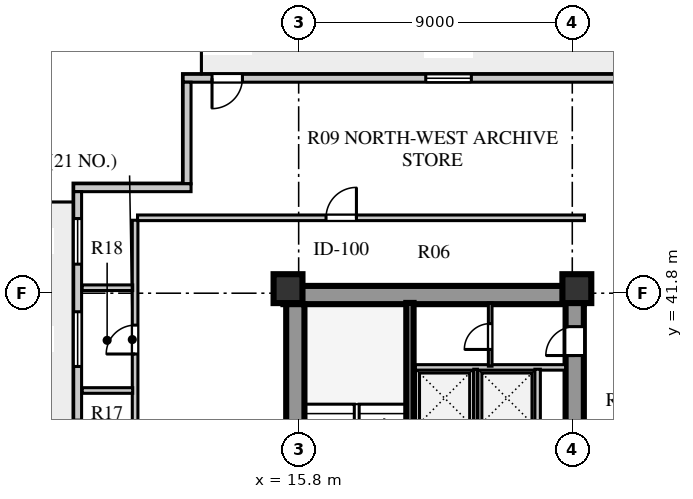
"""IFC4 building model, lengths in metres.
Left out: names, types, materials, properties, quantities, classifications, styles, units other than length and angle.
Written with IfcOpenShell. Run it as: python <this file> out.ifc"""

import sys

from ifc_helpers import new_model, si_unit, direction, frame, frame_2d, origin, origin_2d, place, context, subcontext, project, spatial, rectangle, extrude, element, fill, save


model = new_model("IFC4")
c1 = context("Model", 3, precision=1e-05, world=origin(), true_north=direction((0.0, 1.0)))
c2 = subcontext(c1, "Body", "Model", "MODEL_VIEW")
j1 = project(units=[si_unit("LENGTHUNIT", "METRE"), si_unit("PLANEANGLEUNIT", "RADIAN")], contexts=[c1])
p1 = place(None, origin())
s1 = spatial("IfcSite", under=j1, at=p1, CompositionType="ELEMENT")
p2 = place(p1, origin())
s2 = spatial("IfcBuilding", under=s1, at=p2, CompositionType="ELEMENT")
p3 = place(p2, frame((0.0, 0.0, 82.0)))
s3 = spatial("IfcBuildingStorey", under=s2, at=p3, CompositionType="ELEMENT", Elevation=82.0)
p4 = place(p3, frame((15.3, 41.74, 0.0), z_axis=(0.0, 0.0, 1.0), x_axis=(1.0, 0.0, 0.0)))
e1 = element("IfcWall", 1, at=p4, inside=s3, PredefinedType="SHEAR", context=c2, shape_type="SweptSolid", body=[
    extrude(rectangle(XDim=9.88, YDim=0.6, at=frame_2d((4.94, 0.0))), origin(), (0.0, 0.0, 1.0), 3.74),
])
p5 = place(p3, frame((15.69, 15.81, 0.0), z_axis=(0.0, 0.0, 1.0), x_axis=(0.0, 1.0, 0.0)))
e2 = element("IfcWall", 2, at=p5, inside=s3, PredefinedType="SHEAR", context=c2, shape_type="SweptSolid", body=[
    extrude(rectangle(XDim=25.63, YDim=0.6, at=frame_2d((12.815, 0.0))), origin(), (0.0, 0.0, 1.0), 3.74),
])
p6 = place(p3, frame((24.88, 15.74, 0.0), z_axis=(0.0, 0.0, 1.0), x_axis=(0.0, 1.0, 0.0)))
e3 = element("IfcWall", 3, at=p6, inside=s3, PredefinedType="SHEAR", context=c2, shape_type="SweptSolid", body=[
    extrude(rectangle(XDim=25.76, YDim=0.6, at=frame_2d((12.88, 0.0))), origin(), (0.0, 0.0, 1.0), 3.74),
])
p7 = place(p6, frame((1.61, 0.0, 0.0)))
e4 = element("IfcOpeningElement", 4, at=p7, cuts=e3, PredefinedType="OPENING", context=c2, shape_type="SweptSolid", body=[
    extrude(rectangle(XDim=1.2, YDim=2.1, at=frame_2d((0.6, 1.05))), frame((0.0, 0.31, 0.0), z_axis=(0.0, -1.0, 0.0), x_axis=(1.0, 0.0, 0.0)), (0.0, 0.0, 1.0), 0.62),
])
p8 = place(p6, frame((6.78, 0.0, 0.0)))
e5 = element("IfcOpeningElement", 5, at=p8, cuts=e3, PredefinedType="OPENING", context=c2, shape_type="SweptSolid", body=[
    extrude(rectangle(XDim=0.85, YDim=2.06, at=frame_2d((0.425, 1.03))), frame((0.0, 0.31, 0.0), z_axis=(0.0, -1.0, 0.0), x_axis=(1.0, 0.0, 0.0)), (0.0, 0.0, 1.0), 0.62),
])
p9 = place(p6, frame((12.11, 0.0, 0.0)))
e6 = element("IfcOpeningElement", 6, at=p9, cuts=e3, PredefinedType="OPENING", context=c2, shape_type="SweptSolid", body=[
    extrude(rectangle(XDim=1.5, YDim=2.12, at=frame_2d((0.75, 1.06))), frame((0.0, 0.31, 0.0), z_axis=(0.0, -1.0, 0.0), x_axis=(1.0, 0.0, 0.0)), (0.0, 0.0, 1.0), 0.62),
])
p10 = place(p6, frame((20.11, 0.0, 0.0)))
e7 = element("IfcOpeningElement", 7, at=p10, cuts=e3, PredefinedType="OPENING", context=c2, shape_type="SweptSolid", body=[
    extrude(rectangle(XDim=1.2, YDim=2.12, at=frame_2d((0.6, 1.06))), frame((0.0, 0.31, 0.0), z_axis=(0.0, -1.0, 0.0), x_axis=(1.0, 0.0, 0.0)), (0.0, 0.0, 1.0), 0.62),
])
p11 = place(p6, frame((24.01, 0.0, 0.0)))
e8 = element("IfcOpeningElement", 8, at=p11, cuts=e3, PredefinedType="OPENING", context=c2, shape_type="SweptSolid", body=[
    extrude(rectangle(XDim=0.95, YDim=2.1, at=frame_2d((0.475, 1.05))), frame((0.0, 0.31, 0.0), z_axis=(0.0, -1.0, 0.0), x_axis=(1.0, 0.0, 0.0)), (0.0, 0.0, 1.0), 0.62),
])
for number, where, z_axis, x_axis in (
    (9, (15.45, 41.95, 0.0), (0.0, 0.0, 1.0), (1.0, 0.0, 0.0)),
    (10, (24.95, 41.95, 0.0), (0.0, 0.0, 1.0), (1.0, 0.0, 0.0)),
):
    element("IfcColumn", number, at=place(p3, frame(where, z_axis=z_axis, x_axis=x_axis)), inside=s3, PredefinedType="COLUMN", context=c2, shape_type="SweptSolid", body=[
        extrude(rectangle(XDim=0.95, YDim=0.95, at=origin_2d()), origin(), (0.0, 0.0, 1.0), 3.74),
    ])
p12 = place(p3, frame((46.6, 48.87, 0.0), z_axis=(0.0, 0.0, 1.0), x_axis=(-1.0, 0.0, 0.0)))
e11 = element("IfcWall", 11, at=p12, inside=s3, PredefinedType="SOLIDWALL", context=c2, shape_type="SweptSolid", body=[
    extrude(rectangle(XDim=34.6, YDim=0.26, at=frame_2d((17.3, 0.0))), origin(), (0.0, 0.0, 1.0), 3.74),
])
p13 = place(p12, frame((32.65, 0.0, 0.0)))
e12 = element("IfcOpeningElement", 12, at=p13, cuts=e11, PredefinedType="OPENING", context=c2, shape_type="SweptSolid", body=[
    extrude(rectangle(XDim=1.0, YDim=2.05, at=frame_2d((0.5, 1.025))), frame((0.0, 0.14, 0.0), z_axis=(0.0, -1.0, 0.0), x_axis=(1.0, 0.0, 0.0)), (0.0, 0.0, 1.0), 0.28),
])
p14 = place(p12, frame((25.12, 0.0, 0.8)))
e13 = element("IfcOpeningElement", 13, at=p14, cuts=e11, PredefinedType="OPENING", context=c2, shape_type="SweptSolid", body=[
    extrude(rectangle(XDim=1.5, YDim=2.0, at=frame_2d((0.75, 1.0))), frame((0.0, 0.14, 0.0), z_axis=(0.0, -1.0, 0.0), x_axis=(1.0, 0.0, 0.0)), (0.0, 0.0, 1.0), 0.28),
])
p15 = place(p12, frame((16.5, 0.0, 0.8)))
e14 = element("IfcOpeningElement", 14, at=p15, cuts=e11, PredefinedType="OPENING", context=c2, shape_type="SweptSolid", body=[
    extrude(rectangle(XDim=1.2, YDim=1.75, at=frame_2d((0.6, 0.875))), frame((0.0, 0.14, 0.0), z_axis=(0.0, -1.0, 0.0), x_axis=(1.0, 0.0, 0.0)), (0.0, 0.0, 1.0), 0.28),
])
p16 = place(p12, frame((6.555, 0.0, 0.8)))
e15 = element("IfcOpeningElement", 15, at=p16, cuts=e11, PredefinedType="OPENING", context=c2, shape_type="SweptSolid", body=[
    extrude(rectangle(XDim=2.4, YDim=2.05, at=frame_2d((1.2, 1.025))), frame((0.0, 0.14, 0.0), z_axis=(0.0, -1.0, 0.0), x_axis=(1.0, 0.0, 0.0)), (0.0, 0.0, 1.0), 0.28),
])
p17 = place(p3, frame((12.13, 48.74, 0.0), z_axis=(0.0, 0.0, 1.0), x_axis=(0.0, -1.0, 0.0)))
e16 = element("IfcWall", 16, at=p17, inside=s3, PredefinedType="SOLIDWALL", context=c2, shape_type="SweptSolid", body=[
    extrude(rectangle(XDim=3.34, YDim=0.26, at=frame_2d((1.67, 0.0))), origin(), (0.0, 0.0, 1.0), 3.74),
])
p18 = place(p3, frame((12.26, 45.27, 0.0), z_axis=(0.0, 0.0, 1.0), x_axis=(-1.0, 0.0, 0.0)))
e17 = element("IfcWall", 17, at=p18, inside=s3, PredefinedType="SOLIDWALL", context=c2, shape_type="SweptSolid", body=[
    extrude(rectangle(XDim=3.86, YDim=0.26, at=frame_2d((1.93, 0.0))), origin(), (0.0, 0.0, 1.0), 3.74),
])
p19 = place(p3, frame((8.53, 45.14, 0.0), z_axis=(0.0, 0.0, 1.0), x_axis=(0.0, -1.0, 0.0)))
e18 = element("IfcWall", 18, at=p19, inside=s3, PredefinedType="SOLIDWALL", context=c2, shape_type="SweptSolid", body=[
    extrude(rectangle(XDim=33.08, YDim=0.26, at=frame_2d((16.54, 0.0))), origin(), (0.0, 0.0, 1.0), 3.74),
])
p20 = place(p19, frame((31.39, 0.0, 0.0)))
e19 = element("IfcOpeningElement", 19, at=p20, cuts=e18, PredefinedType="OPENING", context=c2, shape_type="SweptSolid", body=[
    extrude(rectangle(XDim=1.0, YDim=2.05, at=frame_2d((0.5, 1.025))), frame((0.0, 0.14, 0.0), z_axis=(0.0, -1.0, 0.0), x_axis=(1.0, 0.0, 0.0)), (0.0, 0.0, 1.0), 0.28),
])
p21 = place(p19, frame((26.73, 0.0, 0.8)))
e20 = element("IfcOpeningElement", 20, at=p21, cuts=e18, PredefinedType="OPENING", context=c2, shape_type="SweptSolid", body=[
    extrude(rectangle(XDim=2.1, YDim=1.95, at=frame_2d((1.05, 0.975))), frame((0.0, 0.14, 0.0), z_axis=(0.0, -1.0, 0.0), x_axis=(1.0, 0.0, 0.0)), (0.0, 0.0, 1.0), 0.28),
])
p22 = place(p19, frame((22.515, 0.0, 0.8)))
e21 = element("IfcOpeningElement", 21, at=p22, cuts=e18, PredefinedType="OPENING", context=c2, shape_type="SweptSolid", body=[
    extrude(rectangle(XDim=1.35, YDim=1.9, at=frame_2d((0.675, 0.95))), frame((0.0, 0.14, 0.0), z_axis=(0.0, -1.0, 0.0), x_axis=(1.0, 0.0, 0.0)), (0.0, 0.0, 1.0), 0.28),
])
p23 = place(p19, frame((17.415, 0.0, 0.8)))
e22 = element("IfcOpeningElement", 22, at=p23, cuts=e18, PredefinedType="OPENING", context=c2, shape_type="SweptSolid", body=[
    extrude(rectangle(XDim=1.65, YDim=1.95, at=frame_2d((0.825, 0.975))), frame((0.0, 0.14, 0.0), z_axis=(0.0, -1.0, 0.0), x_axis=(1.0, 0.0, 0.0)), (0.0, 0.0, 1.0), 0.28),
])
p24 = place(p19, frame((12.265, 0.0, 0.8)))
e23 = element("IfcOpeningElement", 23, at=p24, cuts=e18, PredefinedType="OPENING", context=c2, shape_type="SweptSolid", body=[
    extrude(rectangle(XDim=1.95, YDim=2.0, at=frame_2d((0.975, 1.0))), frame((0.0, 0.14, 0.0), z_axis=(0.0, -1.0, 0.0), x_axis=(1.0, 0.0, 0.0)), (0.0, 0.0, 1.0), 0.28),
])
p25 = place(p19, frame((7.515, 0.0, 0.8)))
e24 = element("IfcOpeningElement", 24, at=p25, cuts=e18, PredefinedType="OPENING", context=c2, shape_type="SweptSolid", body=[
    extrude(rectangle(XDim=2.25, YDim=2.0, at=frame_2d((1.125, 1.0))), frame((0.0, 0.14, 0.0), z_axis=(0.0, -1.0, 0.0), x_axis=(1.0, 0.0, 0.0)), (0.0, 0.0, 1.0), 0.28),
])
p26 = place(p19, frame((3.95, 0.0, 0.8)))
e25 = element("IfcOpeningElement", 25, at=p26, cuts=e18, PredefinedType="OPENING", context=c2, shape_type="SweptSolid", body=[
    extrude(rectangle(XDim=1.8, YDim=2.0, at=frame_2d((0.9, 1.0))), frame((0.0, 0.14, 0.0), z_axis=(0.0, -1.0, 0.0), x_axis=(1.0, 0.0, 0.0)), (0.0, 0.0, 1.0), 0.28),
])
p27 = place(p19, frame((0.885, 0.0, 0.8)))
e26 = element("IfcOpeningElement", 26, at=p27, cuts=e18, PredefinedType="OPENING", context=c2, shape_type="SweptSolid", body=[
    extrude(rectangle(XDim=1.5, YDim=2.0, at=frame_2d((0.75, 1.0))), frame((0.0, 0.14, 0.0), z_axis=(0.0, -1.0, 0.0), x_axis=(1.0, 0.0, 0.0)), (0.0, 0.0, 1.0), 0.28),
])
p28 = place(p3, frame((19.46, 33.3, 0.0), z_axis=(0.0, 0.0, 1.0), x_axis=(0.0, 1.0, 0.0)))
e27 = element("IfcWall", 27, at=p28, inside=s3, PredefinedType="SHEAR", context=c2, shape_type="SweptSolid", body=[
    extrude(rectangle(XDim=8.18, YDim=0.24, at=frame_2d((4.09, 0.0))), origin(), (0.0, 0.0, 1.0), 4.0),
])
p29 = place(p28, frame((0.65, 0.0, 0.0)))
e28 = element("IfcOpeningElement", 28, at=p29, cuts=e27, PredefinedType="OPENING", context=c2, shape_type="SweptSolid", body=[
    extrude(rectangle(XDim=1.1, YDim=2.1, at=frame_2d((0.55, 1.05))), frame((0.0, 0.13, 0.0), z_axis=(0.0, -1.0, 0.0), x_axis=(1.0, 0.0, 0.0)), (0.0, 0.0, 1.0), 0.26),
])
p30 = place(p3, frame((19.64, 39.36, 0.0), z_axis=(0.0, 0.0, 1.0), x_axis=(1.0, 0.0, 0.0)))
e29 = element("IfcWall", 29, at=p30, inside=s3, PredefinedType="SOLIDWALL", context=c2, shape_type="SweptSolid", body=[
    extrude(rectangle(XDim=4.94, YDim=0.18, at=frame_2d((2.47, 0.0))), origin(), (0.0, 0.0, 1.0), 3.74),
])
p31 = place(p3, frame((21.62, 37.4, 0.0), z_axis=(0.0, 0.0, 1.0), x_axis=(0.0, 1.0, 0.0)))
e30 = element("IfcWall", 30, at=p31, inside=s3, PredefinedType="PARTITIONING", context=c2, shape_type="SweptSolid", body=[
    extrude(rectangle(XDim=1.9, YDim=0.12, at=frame_2d((0.95, 0.0))), origin(), (0.0, 0.0, 1.0), 3.74),
])
p32 = place(p3, frame((23.66, 37.4, 0.0), z_axis=(0.0, 0.0, 1.0), x_axis=(0.0, 1.0, 0.0)))
e31 = element("IfcWall", 31, at=p32, inside=s3, PredefinedType="SOLIDWALL", context=c2, shape_type="SweptSolid", body=[
    extrude(rectangle(XDim=1.9, YDim=0.18, at=frame_2d((0.95, 0.0))), origin(), (0.0, 0.0, 1.0), 3.74),
])
p33 = place(p3, frame((22.1, 39.4, 0.0), z_axis=(0.0, 0.0, 1.0), x_axis=(0.0, 1.0, 0.0)))
e32 = element("IfcWall", 32, at=p33, inside=s3, PredefinedType="PARTITIONING", context=c2, shape_type="SweptSolid", body=[
    extrude(rectangle(XDim=2.08, YDim=0.12, at=frame_2d((1.04, 0.0))), origin(), (0.0, 0.0, 1.0), 3.74),
])
p34 = place(p33, frame((0.55, 0.0, 0.0)))
e33 = element("IfcOpeningElement", 33, at=p34, cuts=e32, PredefinedType="OPENING", context=c2, shape_type="SweptSolid", body=[
    extrude(rectangle(XDim=0.85, YDim=2.06, at=frame_2d((0.425, 1.03))), frame((0.0, 0.07, 0.0), z_axis=(0.0, -1.0, 0.0), x_axis=(1.0, 0.0, 0.0)), (0.0, 0.0, 1.0), 0.14),
])
p35 = place(p3, frame((10.42, 13.0, 0.0), z_axis=(0.0, 0.0, 1.0), x_axis=(0.0, 1.0, 0.0)))
e34 = element("IfcWall", 34, at=p35, inside=s3, PredefinedType="SOLIDWALL", context=c2, shape_type="SweptSolid", body=[
    extrude(rectangle(XDim=31.2, YDim=0.185, at=frame_2d((15.6, 0.0))), origin(), (0.0, 0.0, 1.0), 3.74),
])
p36 = place(p35, frame((3.95, 0.0, 0.0)))
e35 = element("IfcOpeningElement", 35, at=p36, cuts=e34, PredefinedType="OPENING", context=c2, shape_type="SweptSolid", body=[
    extrude(rectangle(XDim=0.95, YDim=2.08, at=frame_2d((0.475, 1.04))), frame((0.0, 0.103, 0.0), z_axis=(0.0, -1.0, 0.0), x_axis=(1.0, 0.0, 0.0)), (0.0, 0.0, 1.0), 0.205),
])
p37 = place(p35, frame((8.5, 0.0, 0.0)))
e36 = element("IfcOpeningElement", 36, at=p37, cuts=e34, PredefinedType="OPENING", context=c2, shape_type="SweptSolid", body=[
    extrude(rectangle(XDim=0.95, YDim=2.08, at=frame_2d((0.475, 1.04))), frame((0.0, 0.103, 0.0), z_axis=(0.0, -1.0, 0.0), x_axis=(1.0, 0.0, 0.0)), (0.0, 0.0, 1.0), 0.205),
])
p38 = place(p35, frame((13.45, 0.0, 0.0)))
e37 = element("IfcOpeningElement", 37, at=p38, cuts=e34, PredefinedType="OPENING", context=c2, shape_type="SweptSolid", body=[
    extrude(rectangle(XDim=0.95, YDim=2.08, at=frame_2d((0.475, 1.04))), frame((0.0, 0.103, 0.0), z_axis=(0.0, -1.0, 0.0), x_axis=(1.0, 0.0, 0.0)), (0.0, 0.0, 1.0), 0.205),
])
p39 = place(p35, frame((18.45, 0.0, 0.0)))
e38 = element("IfcOpeningElement", 38, at=p39, cuts=e34, PredefinedType="OPENING", context=c2, shape_type="SweptSolid", body=[
    extrude(rectangle(XDim=0.95, YDim=2.08, at=frame_2d((0.475, 1.04))), frame((0.0, 0.103, 0.0), z_axis=(0.0, -1.0, 0.0), x_axis=(1.0, 0.0, 0.0)), (0.0, 0.0, 1.0), 0.205),
])
p40 = place(p35, frame((23.05, 0.0, 0.0)))
e39 = element("IfcOpeningElement", 39, at=p40, cuts=e34, PredefinedType="OPENING", context=c2, shape_type="SweptSolid", body=[
    extrude(rectangle(XDim=0.95, YDim=2.08, at=frame_2d((0.475, 1.04))), frame((0.0, 0.103, 0.0), z_axis=(0.0, -1.0, 0.0), x_axis=(1.0, 0.0, 0.0)), (0.0, 0.0, 1.0), 0.205),
])
p41 = place(p35, frame((26.8, 0.0, 0.0)))
e40 = element("IfcOpeningElement", 40, at=p41, cuts=e34, PredefinedType="OPENING", context=c2, shape_type="SweptSolid", body=[
    extrude(rectangle(XDim=0.95, YDim=2.08, at=frame_2d((0.475, 1.04))), frame((0.0, 0.103, 0.0), z_axis=(0.0, -1.0, 0.0), x_axis=(1.0, 0.0, 0.0)), (0.0, 0.0, 1.0), 0.205),
])
p42 = place(p3, frame((8.68, 41.98, 0.0), z_axis=(0.0, 0.0, 1.0), x_axis=(1.0, 0.0, 0.0)))
e41 = element("IfcWall", 41, at=p42, inside=s3, PredefinedType="SOLIDWALL", context=c2, shape_type="SweptSolid", body=[
    extrude(rectangle(XDim=1.66, YDim=0.185, at=frame_2d((0.83, 0.0))), origin(), (0.0, 0.0, 1.0), 3.24),
])
p43 = place(p3, frame((10.5, 44.28, 0.0), z_axis=(0.0, 0.0, 1.0), x_axis=(1.0, 0.0, 0.0)))
e42 = element("IfcWall", 42, at=p43, inside=s3, PredefinedType="SOLIDWALL", context=c2, shape_type="SweptSolid", body=[
    extrude(rectangle(XDim=14.7, YDim=0.185, at=frame_2d((7.35, 0.0))), origin(), (0.0, 0.0, 1.0), 3.74),
])
p44 = place(p43, frame((6.2, 0.0, 0.0)))
e43 = element("IfcOpeningElement", 43, at=p44, cuts=e42, PredefinedType="OPENING", context=c2, shape_type="SweptSolid", body=[
    extrude(rectangle(XDim=1.0, YDim=2.08, at=frame_2d((0.5, 1.04))), frame((0.0, 0.103, 0.0), z_axis=(0.0, -1.0, 0.0), x_axis=(1.0, 0.0, 0.0)), (0.0, 0.0, 1.0), 0.205),
])
p45 = place(p3, frame((8.68, 38.6, 0.0), z_axis=(0.0, 0.0, 1.0), x_axis=(1.0, 0.0, 0.0)))
e44 = element("IfcWall", 44, at=p45, inside=s3, PredefinedType="SOLIDWALL", context=c2, shape_type="SweptSolid", body=[
    extrude(rectangle(XDim=1.66, YDim=0.185, at=frame_2d((0.83, 0.0))), origin(), (0.0, 0.0, 1.0), 3.74),
])
p46 = place(p13, frame((1.0, 0.0, 0.0), z_axis=(0.0, 0.0, 1.0), x_axis=(-1.0, 0.0, 0.0)))
e45 = element("IfcDoor", 45, at=p46, inside=s3, OperationType="SINGLE_SWING_LEFT", PredefinedType="DOOR", context=c2, shape_type="SweptSolid", body=[
    extrude(rectangle(XDim=1.0, YDim=2.05, at=frame_2d((0.5, 1.025))), frame((0.0, 0.025, 0.0), z_axis=(0.0, -1.0, 0.0), x_axis=(1.0, 0.0, 0.0)), (0.0, 0.0, 1.0), 0.05),
])
fill(e12, e45)
p47 = place(p14, origin())
e46 = element("IfcWindow", 46, at=p47, inside=s3, PartitioningType="SINGLE_PANEL", PredefinedType="WINDOW", context=c2, shape_type="SweptSolid", body=[
    extrude(rectangle(XDim=1.5, YDim=2.0, at=frame_2d((0.75, 1.0))), frame((0.0, 0.03, 0.0), z_axis=(0.0, -1.0, 0.0), x_axis=(1.0, 0.0, 0.0)), (0.0, 0.0, 1.0), 0.06),
])
fill(e13, e46)
p48 = place(p26, origin())
e47 = element("IfcWindow", 47, at=p48, inside=s3, PartitioningType="SINGLE_PANEL", PredefinedType="WINDOW", context=c2, shape_type="SweptSolid", body=[
    extrude(rectangle(XDim=1.8, YDim=2.0, at=frame_2d((0.9, 1.0))), frame((0.0, 0.03, 0.0), z_axis=(0.0, -1.0, 0.0), x_axis=(1.0, 0.0, 0.0)), (0.0, 0.0, 1.0), 0.06),
])
fill(e25, e47)
p49 = place(p27, origin())
e48 = element("IfcWindow", 48, at=p49, inside=s3, PartitioningType="SINGLE_PANEL", PredefinedType="WINDOW", context=c2, shape_type="SweptSolid", body=[
    extrude(rectangle(XDim=1.5, YDim=2.0, at=frame_2d((0.75, 1.0))), frame((0.0, 0.03, 0.0), z_axis=(0.0, -1.0, 0.0), x_axis=(1.0, 0.0, 0.0)), (0.0, 0.0, 1.0), 0.06),
])
fill(e26, e48)
p50 = place(p34, origin())
e49 = element("IfcDoor", 49, at=p50, inside=s3, OperationType="SINGLE_SWING_LEFT", PredefinedType="DOOR", context=c2, shape_type="SweptSolid", body=[
    extrude(rectangle(XDim=0.85, YDim=2.06, at=frame_2d((0.425, 1.03))), frame((0.0, 0.025, 0.0), z_axis=(0.0, -1.0, 0.0), x_axis=(1.0, 0.0, 0.0)), (0.0, 0.0, 1.0), 0.05),
])
fill(e33, e49)
p51 = place(p11, frame((0.95, 0.0, 0.0), z_axis=(0.0, 0.0, 1.0), x_axis=(-1.0, 0.0, 0.0)))
e50 = element("IfcDoor", 50, at=p51, inside=s3, OperationType="SINGLE_SWING_RIGHT", PredefinedType="DOOR", context=c2, shape_type="SweptSolid", body=[
    extrude(rectangle(XDim=0.95, YDim=2.1, at=frame_2d((0.475, 1.05))), frame((0.0, 0.025, 0.0), z_axis=(0.0, -1.0, 0.0), x_axis=(1.0, 0.0, 0.0)), (0.0, 0.0, 1.0), 0.05),
])
fill(e8, e50)
p52 = place(p44, origin())
e51 = element("IfcDoor", 51, at=p52, inside=s3, OperationType="SINGLE_SWING_RIGHT", PredefinedType="DOOR", context=c2, shape_type="SweptSolid", body=[
    extrude(rectangle(XDim=1.0, YDim=2.08, at=frame_2d((0.5, 1.04))), frame((0.0, 0.025, 0.0), z_axis=(0.0, -1.0, 0.0), x_axis=(1.0, 0.0, 0.0)), (0.0, 0.0, 1.0), 0.05),
])
fill(e43, e51)
p53 = place(p41, frame((0.95, 0.0, 0.0), z_axis=(0.0, 0.0, 1.0), x_axis=(-1.0, 0.0, 0.0)))
e52 = element("IfcDoor", 52, at=p53, inside=s3, OperationType="SINGLE_SWING_RIGHT", PredefinedType="DOOR", context=c2, shape_type="SweptSolid", body=[
    extrude(rectangle(XDim=0.95, YDim=2.08, at=frame_2d((0.475, 1.04))), frame((0.0, 0.025, 0.0), z_axis=(0.0, -1.0, 0.0), x_axis=(1.0, 0.0, 0.0)), (0.0, 0.0, 1.0), 0.05),
])
fill(e40, e52)
save(model, sys.argv[1])
